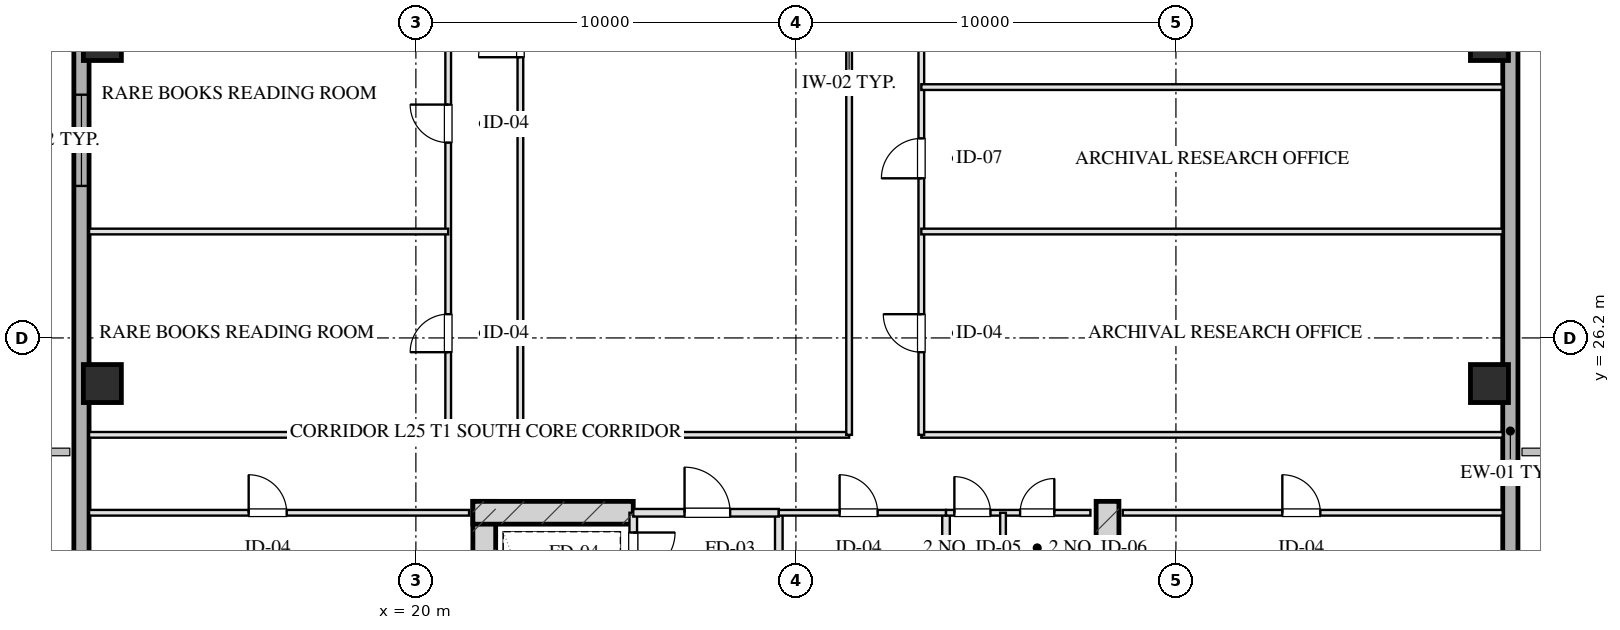
"""IFC4 building model, lengths in metres.
Left out: names, types, materials, properties, quantities, classifications, styles, units other than length and angle.
Written with IfcOpenShell. Run it as: python <this file> out.ifc"""

import sys

from ifc_helpers import new_model, si_unit, direction, frame, frame_2d, origin, origin_2d, place, context, subcontext, project, spatial, rectangle, hollow_rectangle, extrude, element, fill, save


model = new_model("IFC4")
c1 = context("Model", 3, precision=1e-05, world=origin(), true_north=direction((0.0, 1.0)))
c2 = subcontext(c1, "Body", "Model", "MODEL_VIEW")
j1 = project(units=[si_unit("LENGTHUNIT", "METRE"), si_unit("PLANEANGLEUNIT", "RADIAN")], contexts=[c1])
p1 = place(None, origin())
s1 = spatial("IfcSite", under=j1, at=p1, CompositionType="ELEMENT")
p2 = place(p1, origin())
s2 = spatial("IfcBuilding", under=s1, at=p2, CompositionType="ELEMENT")
p3 = place(p2, frame((0.0, 0.0, 100.05)))
s3 = spatial("IfcBuildingStorey", under=s2, at=p3, CompositionType="ELEMENT", Elevation=100.05)
for number, where, z_axis, x_axis in (
    (1, (21.8, 21.9, 0.0), (0.0, 0.0, 1.0), (0.0, -1.0, 0.0)),
    (2, (38.2, 21.9, 0.0), (0.0, 0.0, 1.0), (0.0, -1.0, 0.0)),
):
    element("IfcWall", number, at=place(p3, frame(where, z_axis=z_axis, x_axis=x_axis)), inside=s3, PredefinedType="SHEAR", context=c2, shape_type="SweptSolid", body=[
        extrude(rectangle(XDim=9.48, YDim=0.6, at=frame_2d((4.74, 0.0))), origin(), (0.0, 0.0, 1.0), 3.45),
    ])
p4 = place(p3, frame((21.5, 21.6, 0.0), z_axis=(0.0, 0.0, 1.0), x_axis=(1.0, 0.0, 0.0)))
e3 = element("IfcWall", 3, at=p4, inside=s3, PredefinedType="SHEAR", context=c2, shape_type="SweptSolid", body=[
    extrude(rectangle(XDim=4.22, YDim=0.6, at=frame_2d((2.11, 0.0))), origin(), (0.0, 0.0, 1.0), 3.45),
])
for number, where, z_axis, x_axis in (
    (4, (11.75, 25.0, 0.0), (0.0, 0.0, 1.0), (1.0, 0.0, 0.0)),
    (5, (11.75, 34.0, 0.0), (0.0, 0.0, 1.0), (1.0, 0.0, 0.0)),
    (6, (48.25, 25.0, 0.0), (0.0, 0.0, 1.0), (1.0, 0.0, 0.0)),
    (7, (48.25, 34.0, 0.0), (0.0, 0.0, 1.0), (1.0, 0.0, 0.0)),
):
    element("IfcColumn", number, at=place(p3, frame(where, z_axis=z_axis, x_axis=x_axis)), inside=s3, PredefinedType="COLUMN", context=c2, shape_type="SweptSolid", body=[
        extrude(hollow_rectangle(XDim=1.0, YDim=1.0, WallThickness=0.036, at=origin_2d()), origin(), (0.0, 0.0, 1.0), 3.451),
    ])
p5 = place(p3, frame((11.2, 9.0, 0.0), z_axis=(0.0, 0.0, 1.0), x_axis=(0.0, 1.0, 0.0)))
e8 = element("IfcWall", 8, at=p5, inside=s3, PredefinedType="SOLIDWALL", context=c2, shape_type="SweptSolid", body=[
    extrude(rectangle(XDim=50.0, YDim=0.4, at=frame_2d((25.0, 0.0))), origin(), (0.0, 0.0, 1.0), 2.55),
])
p6 = place(p5, frame((21.2, 0.0, 0.75)))
e9 = element("IfcOpeningElement", 9, at=p6, cuts=e8, PredefinedType="OPENING", context=c2, shape_type="SweptSolid", body=[
    extrude(rectangle(XDim=2.4, YDim=1.4, at=frame_2d((1.2, 0.7))), frame((0.0, 0.21, 0.0), z_axis=(0.0, -1.0, 0.0), x_axis=(1.0, 0.0, 0.0)), (0.0, 0.0, 1.0), 0.42),
])
p7 = place(p5, frame((27.55, 0.0, 0.0)))
e10 = element("IfcOpeningElement", 10, at=p7, cuts=e8, PredefinedType="OPENING", context=c2, shape_type="SweptSolid", body=[
    extrude(rectangle(XDim=1.1, YDim=2.15, at=frame_2d((0.55, 1.075))), frame((0.0, 0.21, 0.0), z_axis=(0.0, -1.0, 0.0), x_axis=(1.0, 0.0, 0.0)), (0.0, 0.0, 1.0), 0.42),
])
p8 = place(p3, frame((48.8, 59.0, 0.0), z_axis=(0.0, 0.0, 1.0), x_axis=(0.0, -1.0, 0.0)))
e11 = element("IfcWall", 11, at=p8, inside=s3, PredefinedType="SOLIDWALL", context=c2, shape_type="SweptSolid", body=[
    extrude(rectangle(XDim=50.0, YDim=0.4, at=frame_2d((25.0, 0.0))), origin(), (0.0, 0.0, 1.0), 2.55),
])
p9 = place(p8, frame((18.65, 0.0, 0.0)))
e12 = element("IfcOpeningElement", 12, at=p9, cuts=e11, PredefinedType="OPENING", context=c2, shape_type="SweptSolid", body=[
    extrude(rectangle(XDim=1.1, YDim=2.15, at=frame_2d((0.55, 1.075))), frame((0.0, 0.21, 0.0), z_axis=(0.0, -1.0, 0.0), x_axis=(1.0, 0.0, 0.0)), (0.0, 0.0, 1.0), 0.42),
])
p10 = place(p3, frame((25.72, 21.6, 0.0), z_axis=(0.0, 0.0, 1.0), x_axis=(0.0, -1.0, 0.0)))
e13 = element("IfcWall", 13, at=p10, inside=s3, PredefinedType="PARTITIONING", context=c2, shape_type="SweptSolid", body=[
    extrude(rectangle(XDim=1.9, YDim=0.2, at=frame_2d((0.95, 0.0))), origin(), (0.0, 0.0, 1.0), 3.155),
])
p11 = place(p10, frame((0.52, 0.0, 0.0)))
e14 = element("IfcOpeningElement", 14, at=p11, cuts=e13, PredefinedType="OPENING", context=c2, shape_type="SweptSolid", body=[
    extrude(rectangle(XDim=1.1, YDim=2.05, at=frame_2d((0.55, 1.025))), frame((0.0, 0.11, 0.0), z_axis=(0.0, -1.0, 0.0), x_axis=(1.0, 0.0, 0.0)), (0.0, 0.0, 1.0), 0.22),
])
p12 = place(p3, frame((29.55, 21.6, 0.0), z_axis=(0.0, 0.0, 1.0), x_axis=(0.0, -1.0, 0.0)))
e15 = element("IfcWall", 15, at=p12, inside=s3, PredefinedType="PARTITIONING", context=c2, shape_type="SweptSolid", body=[
    extrude(rectangle(XDim=8.43, YDim=0.2, at=frame_2d((4.215, 0.0))), origin(), (0.0, 0.0, 1.0), 3.155),
])
p13 = place(p3, frame((25.72, 21.6, 0.0), z_axis=(0.0, 0.0, 1.0), x_axis=(1.0, 0.0, 0.0)))
e16 = element("IfcWall", 16, at=p13, inside=s3, PredefinedType="PARTITIONING", context=c2, shape_type="SweptSolid", body=[
    extrude(rectangle(XDim=3.83, YDim=0.2, at=frame_2d((1.915, 0.0))), origin(), (0.0, 0.0, 1.0), 3.155),
])
p14 = place(p13, frame((1.35, 0.0, 0.0)))
e17 = element("IfcOpeningElement", 17, at=p14, cuts=e16, PredefinedType="OPENING", context=c2, shape_type="SweptSolid", body=[
    extrude(rectangle(XDim=1.2, YDim=2.05, at=frame_2d((0.6, 1.025))), frame((0.0, 0.11, 0.0), z_axis=(0.0, -1.0, 0.0), x_axis=(1.0, 0.0, 0.0)), (0.0, 0.0, 1.0), 0.22),
])
p15 = place(p3, frame((33.95, 21.6, 0.0), z_axis=(0.0, 0.0, 1.0), x_axis=(0.0, -1.0, 0.0)))
e18 = element("IfcWall", 18, at=p15, inside=s3, PredefinedType="PARTITIONING", context=c2, shape_type="SweptSolid", body=[
    extrude(rectangle(XDim=8.43, YDim=0.2, at=frame_2d((4.215, 0.0))), origin(), (0.0, 0.0, 1.0), 3.155),
])
p16 = place(p3, frame((29.55, 21.6, 0.0), z_axis=(0.0, 0.0, 1.0), x_axis=(1.0, 0.0, 0.0)))
e19 = element("IfcWall", 19, at=p16, inside=s3, PredefinedType="PARTITIONING", context=c2, shape_type="SweptSolid", body=[
    extrude(rectangle(XDim=4.4, YDim=0.15, at=frame_2d((2.2, 0.0))), origin(), (0.0, 0.0, 1.0), 3.155),
])
p17 = place(p16, frame((1.6, 0.0, 0.0)))
e20 = element("IfcOpeningElement", 20, at=p17, cuts=e19, PredefinedType="OPENING", context=c2, shape_type="SweptSolid", body=[
    extrude(rectangle(XDim=1.0, YDim=2.05, at=frame_2d((0.5, 1.025))), frame((0.0, 0.085, 0.0), z_axis=(0.0, -1.0, 0.0), x_axis=(1.0, 0.0, 0.0)), (0.0, 0.0, 1.0), 0.17),
])
p18 = place(p3, frame((33.95, 21.6, 0.0), z_axis=(0.0, 0.0, 1.0), x_axis=(1.0, 0.0, 0.0)))
e21 = element("IfcWall", 21, at=p18, inside=s3, PredefinedType="PARTITIONING", context=c2, shape_type="SweptSolid", body=[
    extrude(rectangle(XDim=3.8, YDim=0.15, at=frame_2d((1.9, 0.0))), origin(), (0.0, 0.0, 1.0), 3.155),
])
p19 = place(p18, frame((0.22, 0.0, 0.0)))
e22 = element("IfcOpeningElement", 22, at=p19, cuts=e21, PredefinedType="OPENING", context=c2, shape_type="SweptSolid", body=[
    extrude(rectangle(XDim=0.95, YDim=2.05, at=frame_2d((0.475, 1.025))), frame((0.0, 0.085, 0.0), z_axis=(0.0, -1.0, 0.0), x_axis=(1.0, 0.0, 0.0)), (0.0, 0.0, 1.0), 0.17),
])
p20 = place(p18, frame((1.95, 0.0, 0.0)))
e23 = element("IfcOpeningElement", 23, at=p20, cuts=e21, PredefinedType="OPENING", context=c2, shape_type="SweptSolid", body=[
    extrude(rectangle(XDim=0.9, YDim=2.05, at=frame_2d((0.45, 1.025))), frame((0.0, 0.085, 0.0), z_axis=(0.0, -1.0, 0.0), x_axis=(1.0, 0.0, 0.0)), (0.0, 0.0, 1.0), 0.17),
])
p21 = place(p3, frame((35.45, 21.6, 0.0), z_axis=(0.0, 0.0, 1.0), x_axis=(0.0, -1.0, 0.0)))
e24 = element("IfcWall", 24, at=p21, inside=s3, PredefinedType="PARTITIONING", context=c2, shape_type="SweptSolid", body=[
    extrude(rectangle(XDim=8.43, YDim=0.15, at=frame_2d((4.215, 0.0))), origin(), (0.0, 0.0, 1.0), 2.815),
])
p22 = place(p21, frame((2.55, 0.0, 0.0)))
e25 = element("IfcOpeningElement", 25, at=p22, cuts=e24, PredefinedType="OPENING", context=c2, shape_type="SweptSolid", body=[
    extrude(rectangle(XDim=0.95, YDim=2.05, at=frame_2d((0.475, 1.025))), frame((0.0, 0.085, 0.0), z_axis=(0.0, -1.0, 0.0), x_axis=(1.0, 0.0, 0.0)), (0.0, 0.0, 1.0), 0.17),
])
p23 = place(p21, frame((5.6, 0.0, 0.0)))
e26 = element("IfcOpeningElement", 26, at=p23, cuts=e24, PredefinedType="OPENING", context=c2, shape_type="SweptSolid", body=[
    extrude(rectangle(XDim=0.9, YDim=2.05, at=frame_2d((0.45, 1.025))), frame((0.0, 0.085, 0.0), z_axis=(0.0, -1.0, 0.0), x_axis=(1.0, 0.0, 0.0)), (0.0, 0.0, 1.0), 0.17),
])
p24 = place(p3, frame((11.4, 21.6, 0.0), z_axis=(0.0, 0.0, 1.0), x_axis=(1.0, 0.0, 0.0)))
e27 = element("IfcWall", 27, at=p24, inside=s3, PredefinedType="PARTITIONING", context=c2, shape_type="SweptSolid", body=[
    extrude(rectangle(XDim=10.0, YDim=0.15, at=frame_2d((5.0, 0.0))), origin(), (0.0, 0.0, 1.0), 3.155),
])
p25 = place(p24, frame((4.2, 0.0, 0.0)))
e28 = element("IfcOpeningElement", 28, at=p25, cuts=e27, PredefinedType="OPENING", context=c2, shape_type="SweptSolid", body=[
    extrude(rectangle(XDim=1.0, YDim=2.05, at=frame_2d((0.5, 1.025))), frame((0.0, 0.085, 0.0), z_axis=(0.0, -1.0, 0.0), x_axis=(1.0, 0.0, 0.0)), (0.0, 0.0, 1.0), 0.17),
])
p26 = place(p3, frame((38.6, 21.6, 0.0), z_axis=(0.0, 0.0, 1.0), x_axis=(1.0, 0.0, 0.0)))
e29 = element("IfcWall", 29, at=p26, inside=s3, PredefinedType="PARTITIONING", context=c2, shape_type="SweptSolid", body=[
    extrude(rectangle(XDim=10.0, YDim=0.15, at=frame_2d((5.0, 0.0))), origin(), (0.0, 0.0, 1.0), 3.155),
])
p27 = place(p26, frame((4.2, 0.0, 0.0)))
e30 = element("IfcOpeningElement", 30, at=p27, cuts=e29, PredefinedType="OPENING", context=c2, shape_type="SweptSolid", body=[
    extrude(rectangle(XDim=1.0, YDim=2.05, at=frame_2d((0.5, 1.025))), frame((0.0, 0.085, 0.0), z_axis=(0.0, -1.0, 0.0), x_axis=(1.0, 0.0, 0.0)), (0.0, 0.0, 1.0), 0.17),
])
p28 = place(p3, frame((11.4, 23.65, 0.0), z_axis=(0.0, 0.0, 1.0), x_axis=(1.0, 0.0, 0.0)))
e31 = element("IfcWall", 31, at=p28, inside=s3, PredefinedType="PARTITIONING", context=c2, shape_type="SweptSolid", body=[
    extrude(rectangle(XDim=9.45, YDim=0.15, at=frame_2d((4.725, 0.0))), origin(), (0.0, 0.0, 1.0), 3.155),
])
p29 = place(p3, frame((22.75, 23.65, 0.0), z_axis=(0.0, 0.0, 1.0), x_axis=(1.0, 0.0, 0.0)))
e32 = element("IfcWall", 32, at=p29, inside=s3, PredefinedType="PARTITIONING", context=c2, shape_type="SweptSolid", body=[
    extrude(rectangle(XDim=8.65, YDim=0.15, at=frame_2d((4.325, 0.0))), origin(), (0.0, 0.0, 1.0), 3.155),
])
p30 = place(p3, frame((33.3, 23.65, 0.0), z_axis=(0.0, 0.0, 1.0), x_axis=(1.0, 0.0, 0.0)))
e33 = element("IfcWall", 33, at=p30, inside=s3, PredefinedType="PARTITIONING", context=c2, shape_type="SweptSolid", body=[
    extrude(rectangle(XDim=15.3, YDim=0.15, at=frame_2d((7.65, 0.0))), origin(), (0.0, 0.0, 1.0), 3.155),
])
p31 = place(p3, frame((20.85, 23.65, 0.0), z_axis=(0.0, 0.0, 1.0), x_axis=(0.0, 1.0, 0.0)))
e34 = element("IfcWall", 34, at=p31, inside=s3, PredefinedType="PARTITIONING", context=c2, shape_type="SweptSolid", body=[
    extrude(rectangle(XDim=20.7, YDim=0.15, at=frame_2d((10.35, 0.0))), origin(), (0.0, 0.0, 1.0), 3.155),
])
p32 = place(p31, frame((2.175, 0.0, 0.0)))
e35 = element("IfcOpeningElement", 35, at=p32, cuts=e34, PredefinedType="OPENING", context=c2, shape_type="SweptSolid", body=[
    extrude(rectangle(XDim=1.0, YDim=2.05, at=frame_2d((0.5, 1.025))), frame((0.0, 0.085, 0.0), z_axis=(0.0, -1.0, 0.0), x_axis=(1.0, 0.0, 0.0)), (0.0, 0.0, 1.0), 0.17),
])
p33 = place(p31, frame((7.69, 0.0, 0.0)))
e36 = element("IfcOpeningElement", 36, at=p33, cuts=e34, PredefinedType="OPENING", context=c2, shape_type="SweptSolid", body=[
    extrude(rectangle(XDim=1.0, YDim=2.05, at=frame_2d((0.5, 1.025))), frame((0.0, 0.085, 0.0), z_axis=(0.0, -1.0, 0.0), x_axis=(1.0, 0.0, 0.0)), (0.0, 0.0, 1.0), 0.17),
])
p34 = place(p31, frame((12.69, 0.0, 0.0)))
e37 = element("IfcOpeningElement", 37, at=p34, cuts=e34, PredefinedType="OPENING", context=c2, shape_type="SweptSolid", body=[
    extrude(rectangle(XDim=0.85, YDim=2.05, at=frame_2d((0.425, 1.025))), frame((0.0, 0.085, 0.0), z_axis=(0.0, -1.0, 0.0), x_axis=(1.0, 0.0, 0.0)), (0.0, 0.0, 1.0), 0.17),
])
p35 = place(p31, frame((17.525, 0.0, 0.0)))
e38 = element("IfcOpeningElement", 38, at=p35, cuts=e34, PredefinedType="OPENING", context=c2, shape_type="SweptSolid", body=[
    extrude(rectangle(XDim=1.0, YDim=2.05, at=frame_2d((0.5, 1.025))), frame((0.0, 0.085, 0.0), z_axis=(0.0, -1.0, 0.0), x_axis=(1.0, 0.0, 0.0)), (0.0, 0.0, 1.0), 0.17),
])
p36 = place(p3, frame((22.75, 23.65, 0.0), z_axis=(0.0, 0.0, 1.0), x_axis=(0.0, 1.0, 0.0)))
e39 = element("IfcWall", 39, at=p36, inside=s3, PredefinedType="PARTITIONING", context=c2, shape_type="SweptSolid", body=[
    extrude(rectangle(XDim=20.7, YDim=0.15, at=frame_2d((10.35, 0.0))), origin(), (0.0, 0.0, 1.0), 3.155),
])
p37 = place(p36, frame((9.936, 0.0, 0.0)))
e40 = element("IfcOpeningElement", 40, at=p37, cuts=e39, PredefinedType="OPENING", context=c2, shape_type="SweptSolid", body=[
    extrude(rectangle(XDim=1.1, YDim=2.05, at=frame_2d((0.55, 1.025))), frame((0.0, 0.085, 0.0), z_axis=(0.0, -1.0, 0.0), x_axis=(1.0, 0.0, 0.0)), (0.0, 0.0, 1.0), 0.17),
])
p38 = place(p3, frame((31.4, 23.65, 0.0), z_axis=(0.0, 0.0, 1.0), x_axis=(0.0, 1.0, 0.0)))
e41 = element("IfcWall", 41, at=p38, inside=s3, PredefinedType="PARTITIONING", context=c2, shape_type="SweptSolid", body=[
    extrude(rectangle(XDim=20.7, YDim=0.15, at=frame_2d((10.35, 0.0))), origin(), (0.0, 0.0, 1.0), 3.155),
])
p39 = place(p3, frame((33.3, 23.65, 0.0), z_axis=(0.0, 0.0, 1.0), x_axis=(0.0, 1.0, 0.0)))
e42 = element("IfcWall", 42, at=p39, inside=s3, PredefinedType="PARTITIONING", context=c2, shape_type="SweptSolid", body=[
    extrude(rectangle(XDim=20.7, YDim=0.15, at=frame_2d((10.35, 0.0))), origin(), (0.0, 0.0, 1.0), 3.155),
])
p40 = place(p39, frame((2.175, 0.0, 0.0)))
e43 = element("IfcOpeningElement", 43, at=p40, cuts=e42, PredefinedType="OPENING", context=c2, shape_type="SweptSolid", body=[
    extrude(rectangle(XDim=1.0, YDim=2.05, at=frame_2d((0.5, 1.025))), frame((0.0, 0.085, 0.0), z_axis=(0.0, -1.0, 0.0), x_axis=(1.0, 0.0, 0.0)), (0.0, 0.0, 1.0), 0.17),
])
p41 = place(p39, frame((6.75, 0.0, 0.0)))
e44 = element("IfcOpeningElement", 44, at=p41, cuts=e42, PredefinedType="OPENING", context=c2, shape_type="SweptSolid", body=[
    extrude(rectangle(XDim=1.05, YDim=2.05, at=frame_2d((0.525, 1.025))), frame((0.0, 0.085, 0.0), z_axis=(0.0, -1.0, 0.0), x_axis=(1.0, 0.0, 0.0)), (0.0, 0.0, 1.0), 0.17),
])
p42 = place(p39, frame((11.25, 0.0, 0.0)))
e45 = element("IfcOpeningElement", 45, at=p42, cuts=e42, PredefinedType="OPENING", context=c2, shape_type="SweptSolid", body=[
    extrude(rectangle(XDim=1.0, YDim=2.05, at=frame_2d((0.5, 1.025))), frame((0.0, 0.085, 0.0), z_axis=(0.0, -1.0, 0.0), x_axis=(1.0, 0.0, 0.0)), (0.0, 0.0, 1.0), 0.17),
])
p43 = place(p39, frame((15.75, 0.0, 0.0)))
e46 = element("IfcOpeningElement", 46, at=p43, cuts=e42, PredefinedType="OPENING", context=c2, shape_type="SweptSolid", body=[
    extrude(rectangle(XDim=1.0, YDim=2.05, at=frame_2d((0.5, 1.025))), frame((0.0, 0.085, 0.0), z_axis=(0.0, -1.0, 0.0), x_axis=(1.0, 0.0, 0.0)), (0.0, 0.0, 1.0), 0.17),
])
p44 = place(p39, frame((18.925, 0.0, 0.0)))
e47 = element("IfcOpeningElement", 47, at=p44, cuts=e42, PredefinedType="OPENING", context=c2, shape_type="SweptSolid", body=[
    extrude(rectangle(XDim=1.0, YDim=2.05, at=frame_2d((0.5, 1.025))), frame((0.0, 0.085, 0.0), z_axis=(0.0, -1.0, 0.0), x_axis=(1.0, 0.0, 0.0)), (0.0, 0.0, 1.0), 0.17),
])
p45 = place(p3, frame((11.4, 29.0, 0.0), z_axis=(0.0, 0.0, 1.0), x_axis=(1.0, 0.0, 0.0)))
e48 = element("IfcWall", 48, at=p45, inside=s3, PredefinedType="PARTITIONING", context=c2, shape_type="SweptSolid", body=[
    extrude(rectangle(XDim=9.45, YDim=0.15, at=frame_2d((4.725, 0.0))), origin(), (0.0, 0.0, 1.0), 3.155),
])
for number, where, z_axis, x_axis in (
    (49, (33.3, 29.0, 0.0), (0.0, 0.0, 1.0), (1.0, 0.0, 0.0)),
    (50, (33.3, 32.8, 0.0), (0.0, 0.0, 1.0), (1.0, 0.0, 0.0)),
):
    element("IfcWall", number, at=place(p3, frame(where, z_axis=z_axis, x_axis=x_axis)), inside=s3, PredefinedType="PARTITIONING", context=c2, shape_type="SweptSolid", body=[
        extrude(rectangle(XDim=15.3, YDim=0.15, at=frame_2d((7.65, 0.0))), origin(), (0.0, 0.0, 1.0), 3.155),
    ])
p46 = place(p6, origin())
e51 = element("IfcWindow", 51, at=p46, inside=s3, PartitioningType="TRIPLE_PANEL_VERTICAL", PredefinedType="WINDOW", context=c2, shape_type="SweptSolid", body=[
    extrude(rectangle(XDim=2.4, YDim=1.4, at=frame_2d((1.2, 0.7))), frame((0.0, 0.03, 0.0), z_axis=(0.0, -1.0, 0.0), x_axis=(1.0, 0.0, 0.0)), (0.0, 0.0, 1.0), 0.06),
])
fill(e9, e51)
p47 = place(p11, origin())
e52 = element("IfcDoor", 52, at=p47, inside=s3, OperationType="SINGLE_SWING_LEFT", PredefinedType="DOOR", context=c2, shape_type="SweptSolid", body=[
    extrude(rectangle(XDim=1.1, YDim=2.05, at=frame_2d((0.55, 1.025))), frame((0.0, 0.025, 0.0), z_axis=(0.0, -1.0, 0.0), x_axis=(1.0, 0.0, 0.0)), (0.0, 0.0, 1.0), 0.05),
])
fill(e14, e52)
p48 = place(p14, origin())
e53 = element("IfcDoor", 53, at=p48, inside=s3, OperationType="SINGLE_SWING_LEFT", PredefinedType="DOOR", context=c2, shape_type="SweptSolid", body=[
    extrude(rectangle(XDim=1.2, YDim=2.05, at=frame_2d((0.6, 1.025))), frame((0.0, 0.025, 0.0), z_axis=(0.0, -1.0, 0.0), x_axis=(1.0, 0.0, 0.0)), (0.0, 0.0, 1.0), 0.05),
])
fill(e17, e53)
p49 = place(p17, origin())
e54 = element("IfcDoor", 54, at=p49, inside=s3, OperationType="SINGLE_SWING_LEFT", PredefinedType="DOOR", context=c2, shape_type="SweptSolid", body=[
    extrude(rectangle(XDim=1.0, YDim=2.05, at=frame_2d((0.5, 1.025))), frame((0.0, 0.025, 0.0), z_axis=(0.0, -1.0, 0.0), x_axis=(1.0, 0.0, 0.0)), (0.0, 0.0, 1.0), 0.05),
])
fill(e20, e54)
p50 = place(p19, origin())
e55 = element("IfcDoor", 55, at=p50, inside=s3, OperationType="SINGLE_SWING_LEFT", PredefinedType="DOOR", context=c2, shape_type="SweptSolid", body=[
    extrude(rectangle(XDim=0.95, YDim=2.05, at=frame_2d((0.475, 1.025))), frame((0.0, 0.025, 0.0), z_axis=(0.0, -1.0, 0.0), x_axis=(1.0, 0.0, 0.0)), (0.0, 0.0, 1.0), 0.05),
])
fill(e22, e55)
p51 = place(p20, origin())
e56 = element("IfcDoor", 56, at=p51, inside=s3, OperationType="SINGLE_SWING_RIGHT", PredefinedType="DOOR", context=c2, shape_type="SweptSolid", body=[
    extrude(rectangle(XDim=0.9, YDim=2.05, at=frame_2d((0.45, 1.025))), frame((0.0, 0.025, 0.0), z_axis=(0.0, -1.0, 0.0), x_axis=(1.0, 0.0, 0.0)), (0.0, 0.0, 1.0), 0.05),
])
fill(e23, e56)
p52 = place(p25, origin())
e57 = element("IfcDoor", 57, at=p52, inside=s3, OperationType="SINGLE_SWING_LEFT", PredefinedType="DOOR", context=c2, shape_type="SweptSolid", body=[
    extrude(rectangle(XDim=1.0, YDim=2.05, at=frame_2d((0.5, 1.025))), frame((0.0, 0.025, 0.0), z_axis=(0.0, -1.0, 0.0), x_axis=(1.0, 0.0, 0.0)), (0.0, 0.0, 1.0), 0.05),
])
fill(e28, e57)
p53 = place(p27, origin())
e58 = element("IfcDoor", 58, at=p53, inside=s3, OperationType="SINGLE_SWING_LEFT", PredefinedType="DOOR", context=c2, shape_type="SweptSolid", body=[
    extrude(rectangle(XDim=1.0, YDim=2.05, at=frame_2d((0.5, 1.025))), frame((0.0, 0.025, 0.0), z_axis=(0.0, -1.0, 0.0), x_axis=(1.0, 0.0, 0.0)), (0.0, 0.0, 1.0), 0.05),
])
fill(e30, e58)
p54 = place(p32, origin())
e59 = element("IfcDoor", 59, at=p54, inside=s3, OperationType="SINGLE_SWING_LEFT", PredefinedType="DOOR", context=c2, shape_type="SweptSolid", body=[
    extrude(rectangle(XDim=1.0, YDim=2.05, at=frame_2d((0.5, 1.025))), frame((0.0, 0.025, 0.0), z_axis=(0.0, -1.0, 0.0), x_axis=(1.0, 0.0, 0.0)), (0.0, 0.0, 1.0), 0.05),
])
fill(e35, e59)
p55 = place(p33, origin())
e60 = element("IfcDoor", 60, at=p55, inside=s3, OperationType="SINGLE_SWING_RIGHT", PredefinedType="DOOR", context=c2, shape_type="SweptSolid", body=[
    extrude(rectangle(XDim=1.0, YDim=2.05, at=frame_2d((0.5, 1.025))), frame((0.0, 0.025, 0.0), z_axis=(0.0, -1.0, 0.0), x_axis=(1.0, 0.0, 0.0)), (0.0, 0.0, 1.0), 0.05),
])
fill(e36, e60)
p56 = place(p37, origin())
e61 = element("IfcDoor", 61, at=p56, inside=s3, OperationType="SINGLE_SWING_LEFT", PredefinedType="DOOR", context=c2, shape_type="SweptSolid", body=[
    extrude(rectangle(XDim=1.1, YDim=2.05, at=frame_2d((0.55, 1.025))), frame((0.0, 0.025, 0.0), z_axis=(0.0, -1.0, 0.0), x_axis=(1.0, 0.0, 0.0)), (0.0, 0.0, 1.0), 0.05),
])
fill(e40, e61)
p57 = place(p40, origin())
e62 = element("IfcDoor", 62, at=p57, inside=s3, OperationType="SINGLE_SWING_RIGHT", PredefinedType="DOOR", context=c2, shape_type="SweptSolid", body=[
    extrude(rectangle(XDim=1.0, YDim=2.05, at=frame_2d((0.5, 1.025))), frame((0.0, 0.025, 0.0), z_axis=(0.0, -1.0, 0.0), x_axis=(1.0, 0.0, 0.0)), (0.0, 0.0, 1.0), 0.05),
])
fill(e43, e62)
p58 = place(p41, origin())
e63 = element("IfcDoor", 63, at=p58, inside=s3, OperationType="SINGLE_SWING_LEFT", PredefinedType="DOOR", context=c2, shape_type="SweptSolid", body=[
    extrude(rectangle(XDim=1.05, YDim=2.05, at=frame_2d((0.525, 1.025))), frame((0.0, 0.025, 0.0), z_axis=(0.0, -1.0, 0.0), x_axis=(1.0, 0.0, 0.0)), (0.0, 0.0, 1.0), 0.05),
])
fill(e44, e63)
save(model, sys.argv[1])
